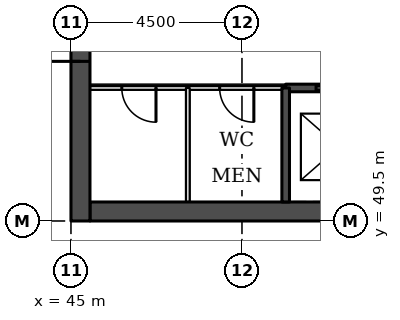
"""IFC4 building model, lengths in metres.
Left out: names, types, materials, properties, quantities, classifications, styles, units other than length and angle.
Written with IfcOpenShell. Run it as: python <this file> out.ifc"""

import sys

from ifc_helpers import new_model, si_unit, direction, frame, frame_2d, origin, place, context, subcontext, project, spatial, rectangle, extrude, element, fill, save


model = new_model("IFC4")
c1 = context("Model", 3, precision=1e-05, world=origin(), true_north=direction((0.0, 1.0)))
c2 = subcontext(c1, "Body", "Model", "MODEL_VIEW")
j1 = project(units=[si_unit("LENGTHUNIT", "METRE"), si_unit("PLANEANGLEUNIT", "RADIAN")], contexts=[c1])
p1 = place(None, origin())
s1 = spatial("IfcSite", under=j1, at=p1, CompositionType="ELEMENT")
p2 = place(p1, origin())
s2 = spatial("IfcBuilding", under=s1, at=p2, CompositionType="ELEMENT")
p3 = place(p2, frame((0.0, 0.0, -4.5)))
s3 = spatial("IfcBuildingStorey", under=s2, at=p3, CompositionType="ELEMENT", Elevation=-4.5)
p4 = place(p3, frame((45.5, 49.75, 0.0), z_axis=(0.0, 0.0, 1.0), x_axis=(1.0, 0.0, 0.0)))
e1 = element("IfcWall", 1, at=p4, inside=s3, PredefinedType="SHEAR", context=c2, shape_type="SweptSolid", body=[
    extrude(rectangle(XDim=21.5, YDim=0.5, at=frame_2d((10.75, 0.0))), origin(), (0.0, 0.0, 1.0), 4.5),
])
p5 = place(p3, frame((45.25, 49.5, 0.0), z_axis=(0.0, 0.0, 1.0), x_axis=(0.0, 1.0, 0.0)))
e2 = element("IfcWall", 2, at=p5, inside=s3, PredefinedType="SHEAR", context=c2, shape_type="SweptSolid", body=[
    extrude(rectangle(XDim=22.5, YDim=0.5, at=frame_2d((11.25, 0.0))), origin(), (0.0, 0.0, 1.0), 4.5),
])
p6 = place(p5, frame((4.2, 0.0, 0.0)))
e3 = element("IfcOpeningElement", 3, at=p6, cuts=e2, PredefinedType="OPENING", context=c2, shape_type="SweptSolid", body=[
    extrude(rectangle(XDim=1.8, YDim=2.1, at=frame_2d((0.9, 1.05))), frame((0.0, 0.26, 0.0), z_axis=(0.0, -1.0, 0.0), x_axis=(1.0, 0.0, 0.0)), (0.0, 0.0, 1.0), 0.52),
])
p7 = place(p5, frame((6.9, 0.0, 0.0)))
e4 = element("IfcOpeningElement", 4, at=p7, cuts=e2, PredefinedType="OPENING", context=c2, shape_type="SweptSolid", body=[
    extrude(rectangle(XDim=1.1, YDim=2.1, at=frame_2d((0.55, 1.05))), frame((0.0, 0.26, 0.0), z_axis=(0.0, -1.0, 0.0), x_axis=(1.0, 0.0, 0.0)), (0.0, 0.0, 1.0), 0.52),
])
p8 = place(p5, frame((13.6, 0.0, 0.0)))
e5 = element("IfcOpeningElement", 5, at=p8, cuts=e2, PredefinedType="OPENING", context=c2, shape_type="SweptSolid", body=[
    extrude(rectangle(XDim=1.1, YDim=2.1, at=frame_2d((0.55, 1.05))), frame((0.0, 0.26, 0.0), z_axis=(0.0, -1.0, 0.0), x_axis=(1.0, 0.0, 0.0)), (0.0, 0.0, 1.0), 0.52),
])
p9 = place(p5, frame((16.5, 0.0, 0.0)))
e6 = element("IfcOpeningElement", 6, at=p9, cuts=e2, PredefinedType="OPENING", context=c2, shape_type="SweptSolid", body=[
    extrude(rectangle(XDim=1.8, YDim=2.1, at=frame_2d((0.9, 1.05))), frame((0.0, 0.26, 0.0), z_axis=(0.0, -1.0, 0.0), x_axis=(1.0, 0.0, 0.0)), (0.0, 0.0, 1.0), 0.52),
])
p10 = place(p3, frame((45.5, 53.0, 0.0), z_axis=(0.0, 0.0, 1.0), x_axis=(1.0, 0.0, 0.0)))
e7 = element("IfcWall", 7, at=p10, inside=s3, PredefinedType="PARTITIONING", context=c2, shape_type="SweptSolid", body=[
    extrude(rectangle(XDim=5.15, YDim=0.1, at=frame_2d((2.575, 0.0))), origin(), (0.0, 0.0, 1.0), 4.1),
])
p11 = place(p10, frame((0.837, 0.0, 0.0)))
e8 = element("IfcOpeningElement", 8, at=p11, cuts=e7, PredefinedType="OPENING", context=c2, shape_type="SweptSolid", body=[
    extrude(rectangle(XDim=0.9, YDim=2.1, at=frame_2d((0.45, 1.05))), frame((0.0, 0.06, 0.0), z_axis=(0.0, -1.0, 0.0), x_axis=(1.0, 0.0, 0.0)), (0.0, 0.0, 1.0), 0.12),
])
p12 = place(p10, frame((3.413, 0.0, 0.0)))
e9 = element("IfcOpeningElement", 9, at=p12, cuts=e7, PredefinedType="OPENING", context=c2, shape_type="SweptSolid", body=[
    extrude(rectangle(XDim=0.9, YDim=2.1, at=frame_2d((0.45, 1.05))), frame((0.0, 0.06, 0.0), z_axis=(0.0, -1.0, 0.0), x_axis=(1.0, 0.0, 0.0)), (0.0, 0.0, 1.0), 0.12),
])
p13 = place(p3, frame((50.65, 53.0, 0.0), z_axis=(0.0, 0.0, 1.0), x_axis=(1.0, 0.0, 0.0)))
e10 = element("IfcWall", 10, at=p13, inside=s3, PredefinedType="SOLIDWALL", context=c2, shape_type="SweptSolid", body=[
    extrude(rectangle(XDim=11.2, YDim=0.2, at=frame_2d((5.6, 0.0))), origin(), (0.0, 0.0, 1.0), 4.1),
])
p14 = place(p13, frame((0.8, 0.0, 0.0)))
e11 = element("IfcOpeningElement", 11, at=p14, cuts=e10, PredefinedType="OPENING", context=c2, shape_type="SweptSolid", body=[
    extrude(rectangle(XDim=1.2, YDim=2.1, at=frame_2d((0.6, 1.05))), frame((0.0, 0.11, 0.0), z_axis=(0.0, -1.0, 0.0), x_axis=(1.0, 0.0, 0.0)), (0.0, 0.0, 1.0), 0.22),
])
p15 = place(p13, frame((3.6, 0.0, 0.0)))
e12 = element("IfcOpeningElement", 12, at=p15, cuts=e10, PredefinedType="OPENING", context=c2, shape_type="SweptSolid", body=[
    extrude(rectangle(XDim=1.2, YDim=2.1, at=frame_2d((0.6, 1.05))), frame((0.0, 0.11, 0.0), z_axis=(0.0, -1.0, 0.0), x_axis=(1.0, 0.0, 0.0)), (0.0, 0.0, 1.0), 0.22),
])
p16 = place(p13, frame((6.4, 0.0, 0.0)))
e13 = element("IfcOpeningElement", 13, at=p16, cuts=e10, PredefinedType="OPENING", context=c2, shape_type="SweptSolid", body=[
    extrude(rectangle(XDim=1.2, YDim=2.1, at=frame_2d((0.6, 1.05))), frame((0.0, 0.11, 0.0), z_axis=(0.0, -1.0, 0.0), x_axis=(1.0, 0.0, 0.0)), (0.0, 0.0, 1.0), 0.22),
])
p17 = place(p13, frame((9.2, 0.0, 0.0)))
e14 = element("IfcOpeningElement", 14, at=p17, cuts=e10, PredefinedType="OPENING", context=c2, shape_type="SweptSolid", body=[
    extrude(rectangle(XDim=1.2, YDim=2.1, at=frame_2d((0.6, 1.05))), frame((0.0, 0.11, 0.0), z_axis=(0.0, -1.0, 0.0), x_axis=(1.0, 0.0, 0.0)), (0.0, 0.0, 1.0), 0.22),
])
p18 = place(p3, frame((48.075, 50.0, 0.0), z_axis=(0.0, 0.0, 1.0), x_axis=(0.0, 1.0, 0.0)))
e15 = element("IfcWall", 15, at=p18, inside=s3, PredefinedType="PARTITIONING", context=c2, shape_type="SweptSolid", body=[
    extrude(rectangle(XDim=3.0, YDim=0.1, at=frame_2d((1.5, 0.0))), origin(), (0.0, 0.0, 1.0), 4.1),
])
p19 = place(p3, frame((50.65, 50.0, 0.0), z_axis=(0.0, 0.0, 1.0), x_axis=(0.0, 1.0, 0.0)))
e16 = element("IfcWall", 16, at=p19, inside=s3, PredefinedType="SOLIDWALL", context=c2, shape_type="SweptSolid", body=[
    extrude(rectangle(XDim=3.0, YDim=0.2, at=frame_2d((1.5, 0.0))), origin(), (0.0, 0.0, 1.0), 4.1),
])
p20 = place(p14, origin())
e17 = element("IfcDoor", 17, at=p20, inside=s3, OperationType="DOUBLE_DOOR_SLIDING", PredefinedType="DOOR", context=c2, shape_type="SweptSolid", body=[
    extrude(rectangle(XDim=1.2, YDim=2.1, at=frame_2d((0.6, 1.05))), frame((0.0, 0.025, 0.0), z_axis=(0.0, -1.0, 0.0), x_axis=(1.0, 0.0, 0.0)), (0.0, 0.0, 1.0), 0.05),
])
fill(e11, e17)
p21 = place(p6, origin())
e18 = element("IfcDoor", 18, at=p21, inside=s3, OperationType="SINGLE_SWING_LEFT", PredefinedType="DOOR", context=c2, shape_type="SweptSolid", body=[
    extrude(rectangle(XDim=1.8, YDim=2.1, at=frame_2d((0.9, 1.05))), frame((0.0, 0.025, 0.0), z_axis=(0.0, -1.0, 0.0), x_axis=(1.0, 0.0, 0.0)), (0.0, 0.0, 1.0), 0.05),
])
fill(e3, e18)
p22 = place(p11, frame((0.9, 0.0, 0.0), z_axis=(0.0, 0.0, 1.0), x_axis=(-1.0, 0.0, 0.0)))
e19 = element("IfcDoor", 19, at=p22, inside=s3, OperationType="SINGLE_SWING_LEFT", PredefinedType="DOOR", context=c2, shape_type="SweptSolid", body=[
    extrude(rectangle(XDim=0.9, YDim=2.1, at=frame_2d((0.45, 1.05))), frame((0.0, 0.025, 0.0), z_axis=(0.0, -1.0, 0.0), x_axis=(1.0, 0.0, 0.0)), (0.0, 0.0, 1.0), 0.05),
])
fill(e8, e19)
p23 = place(p12, frame((0.9, 0.0, 0.0), z_axis=(0.0, 0.0, 1.0), x_axis=(-1.0, 0.0, 0.0)))
e20 = element("IfcDoor", 20, at=p23, inside=s3, OperationType="SINGLE_SWING_LEFT", PredefinedType="DOOR", context=c2, shape_type="SweptSolid", body=[
    extrude(rectangle(XDim=0.9, YDim=2.1, at=frame_2d((0.45, 1.05))), frame((0.0, 0.025, 0.0), z_axis=(0.0, -1.0, 0.0), x_axis=(1.0, 0.0, 0.0)), (0.0, 0.0, 1.0), 0.05),
])
fill(e9, e20)
save(model, sys.argv[1])
